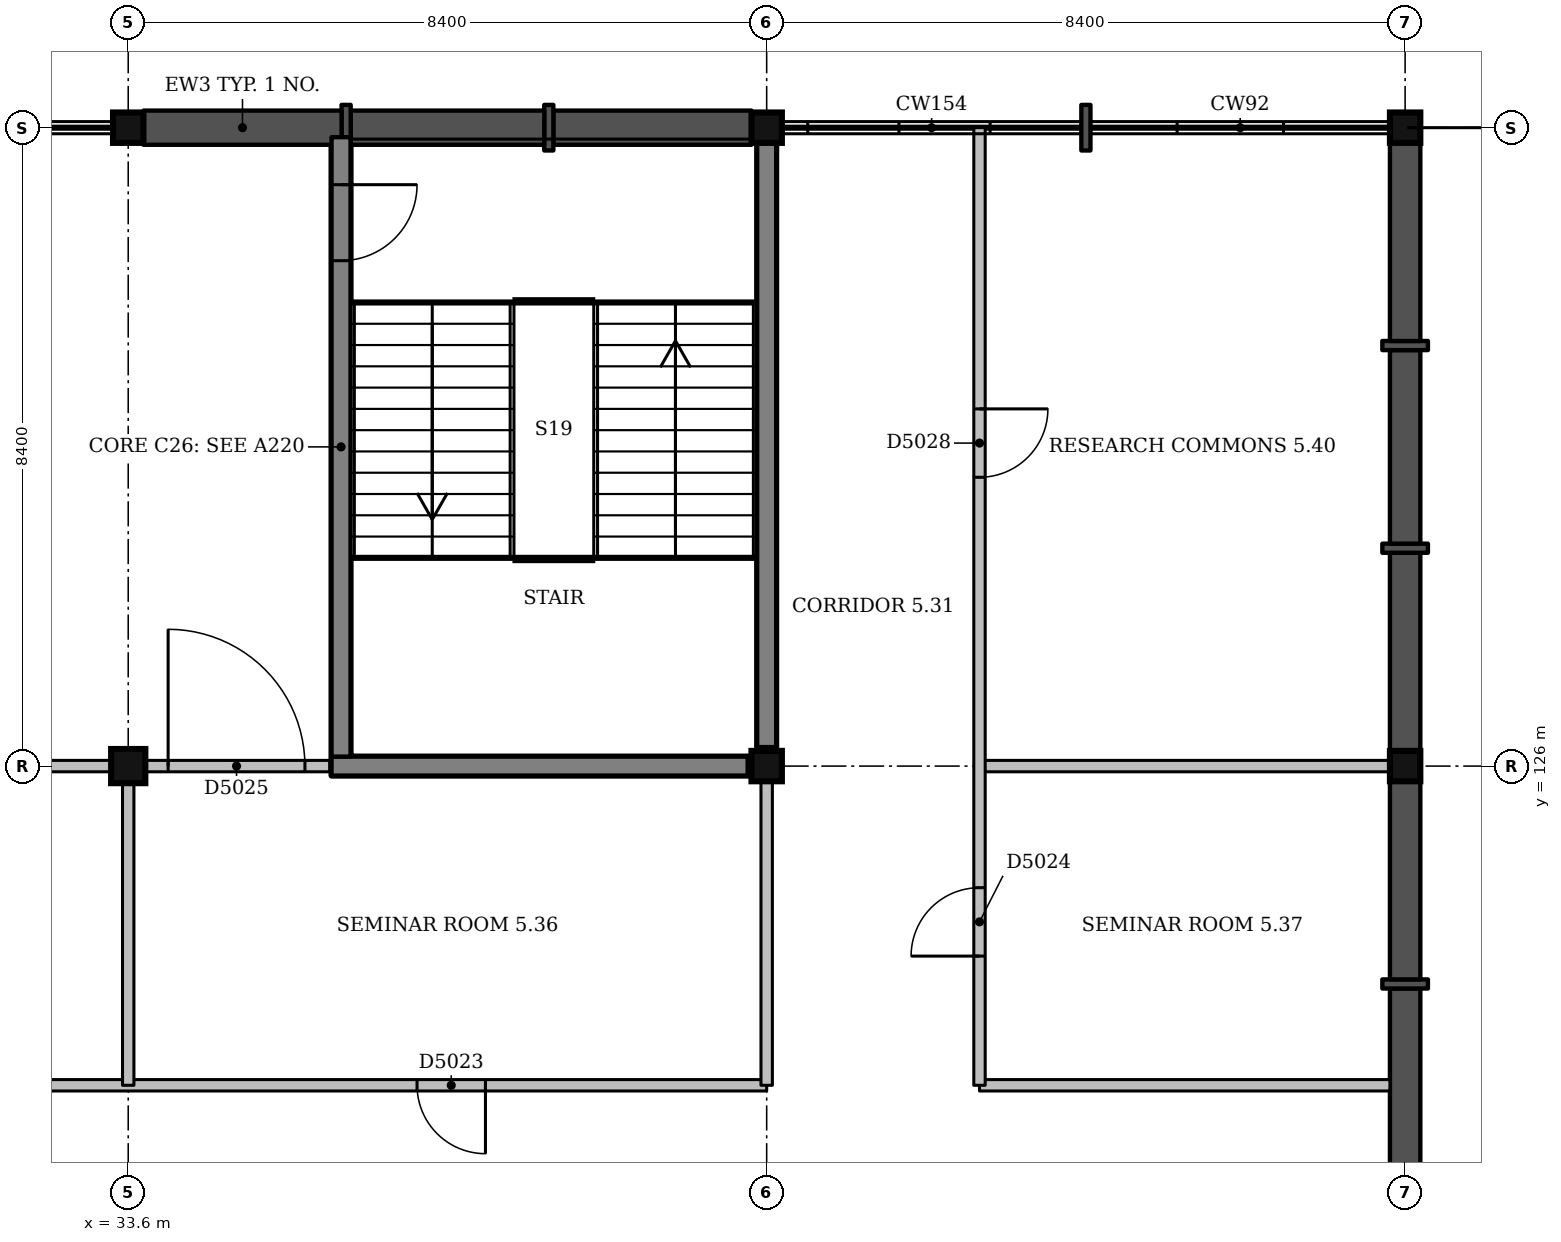
"""IFC4 building model, lengths in metres.
Left out: names, types, materials, properties, quantities, classifications, styles, units other than length and angle.
Written with IfcOpenShell. Run it as: python <this file> out.ifc"""

import sys

from ifc_helpers import new_model, si_unit, direction, frame, frame_2d, origin, origin_2d, place, context, subcontext, project, spatial, rectangle, extrude, element, fill, save


model = new_model("IFC4")
c1 = context("Model", 3, precision=1e-05, world=origin(), true_north=direction((0.0, 1.0)))
c2 = subcontext(c1, "Body", "Model", "MODEL_VIEW")
j1 = project(units=[si_unit("LENGTHUNIT", "METRE"), si_unit("PLANEANGLEUNIT", "RADIAN")], contexts=[c1])
p1 = place(None, origin())
s1 = spatial("IfcSite", under=j1, at=p1, CompositionType="ELEMENT")
p2 = place(p1, origin())
s2 = spatial("IfcBuilding", under=s1, at=p2, CompositionType="ELEMENT")
p3 = place(p2, frame((0.0, 0.0, 22.5)))
s3 = spatial("IfcBuildingStorey", under=s2, at=p3, CompositionType="ELEMENT", Elevation=22.5)
p4 = place(p3, frame((33.6, 126.0, 0.0), z_axis=(0.0, 0.0, 1.0), x_axis=(1.0, 0.0, 0.0)))
e1 = element("IfcColumn", 1, at=p4, inside=s3, PredefinedType="COLUMN", context=c2, shape_type="SweptSolid", body=[
    extrude(rectangle(XDim=0.45, YDim=0.45, at=origin_2d()), origin(), (0.0, 0.0, 1.0), 4.5),
])
for number, where, z_axis, x_axis in (
    (2, (33.6, 134.4, 0.0), (0.0, 0.0, 1.0), (1.0, 0.0, 0.0)),
    (3, (42.0, 126.0, 0.0), (0.0, 0.0, 1.0), (1.0, 0.0, 0.0)),
    (4, (42.0, 134.4, 0.0), (0.0, 0.0, 1.0), (1.0, 0.0, 0.0)),
    (5, (50.4, 126.0, 0.0), (0.0, 0.0, 1.0), (1.0, 0.0, 0.0)),
    (6, (50.4, 134.4, 0.0), (0.0, 0.0, 1.0), (1.0, 0.0, 0.0)),
):
    element("IfcColumn", number, at=place(p3, frame(where, z_axis=z_axis, x_axis=x_axis)), inside=s3, PredefinedType="COLUMN", context=c2, shape_type="SweptSolid", body=[
        extrude(rectangle(XDim=0.4, YDim=0.4, at=origin_2d()), origin(), (0.0, 0.0, 1.0), 4.5),
    ])
p5 = place(p3, frame((36.275, 126.0, 0.0), z_axis=(0.0, 0.0, 1.0), x_axis=(1.0, 0.0, 0.0)))
e7 = element("IfcWall", 7, at=p5, inside=s3, PredefinedType="SHEAR", context=c2, shape_type="SweptSolid", body=[
    extrude(rectangle(XDim=5.475, YDim=0.25, at=frame_2d((2.738, 0.0))), origin(), (0.0, 0.0, 1.0), 4.5),
])
p6 = place(p3, frame((36.4, 126.125, 0.0), z_axis=(0.0, 0.0, 1.0), x_axis=(0.0, 1.0, 0.0)))
e8 = element("IfcWall", 8, at=p6, inside=s3, PredefinedType="SHEAR", context=c2, shape_type="SweptSolid", body=[
    extrude(rectangle(XDim=8.15, YDim=0.25, at=frame_2d((4.075, 0.0))), origin(), (0.0, 0.0, 1.0), 4.5),
])
p7 = place(p6, frame((6.525, 0.0, 0.0)))
e9 = element("IfcOpeningElement", 9, at=p7, cuts=e8, PredefinedType="OPENING", context=c2, shape_type="SweptSolid", body=[
    extrude(rectangle(XDim=1.0, YDim=2.1, at=frame_2d((0.5, 1.05))), frame((0.0, 0.135, 0.0), z_axis=(0.0, -1.0, 0.0), x_axis=(1.0, 0.0, 0.0)), (0.0, 0.0, 1.0), 0.27),
])
p8 = place(p3, frame((42.0, 126.25, 0.0), z_axis=(0.0, 0.0, 1.0), x_axis=(0.0, 1.0, 0.0)))
e10 = element("IfcWall", 10, at=p8, inside=s3, PredefinedType="SHEAR", context=c2, shape_type="SweptSolid", body=[
    extrude(rectangle(XDim=7.95, YDim=0.25, at=frame_2d((3.975, 0.0))), origin(), (0.0, 0.0, 1.0), 4.5),
])
p9 = place(p3, frame((50.4, 120.527, 0.0), z_axis=(0.0, 0.0, 1.0), x_axis=(0.0, 1.0, 0.0)))
e11 = element("IfcWall", 11, at=p9, inside=s3, PredefinedType="SOLIDWALL", context=c2, shape_type="SweptSolid", body=[
    extrude(rectangle(XDim=2.547, YDim=0.4, at=frame_2d((1.273, 0.0))), origin(), (0.0, 0.0, 1.0), 3.35),
])
p10 = place(p3, frame((50.4, 123.073, 0.0), z_axis=(0.0, 0.0, 1.0), x_axis=(0.0, 1.0, 0.0)))
e12 = element("IfcWall", 12, at=p10, inside=s3, PredefinedType="SOLIDWALL", context=c2, shape_type="SweptSolid", body=[
    extrude(rectangle(XDim=0.12, YDim=0.6, at=frame_2d((0.06, 0.0))), origin(), (0.0, 0.0, 1.0), 3.35),
])
for number, where, z_axis, x_axis in (
    (13, (50.4, 123.193, 0.0), (0.0, 0.0, 1.0), (0.0, 1.0, 0.0)),
    (14, (50.4, 126.2, 0.0), (0.0, 0.0, 1.0), (0.0, 1.0, 0.0)),
):
    element("IfcWall", number, at=place(p3, frame(where, z_axis=z_axis, x_axis=x_axis)), inside=s3, PredefinedType="SOLIDWALL", context=c2, shape_type="SweptSolid", body=[
        extrude(rectangle(XDim=2.607, YDim=0.4, at=frame_2d((1.303, 0.0))), origin(), (0.0, 0.0, 1.0), 3.35),
    ])
p11 = place(p3, frame((50.4, 128.807, 0.0), z_axis=(0.0, 0.0, 1.0), x_axis=(0.0, 1.0, 0.0)))
e15 = element("IfcWall", 15, at=p11, inside=s3, PredefinedType="SOLIDWALL", context=c2, shape_type="SweptSolid", body=[
    extrude(rectangle(XDim=0.12, YDim=0.6, at=frame_2d((0.06, 0.0))), origin(), (0.0, 0.0, 1.0), 3.35),
])
p12 = place(p3, frame((50.4, 128.927, 0.0), z_axis=(0.0, 0.0, 1.0), x_axis=(0.0, 1.0, 0.0)))
e16 = element("IfcWall", 16, at=p12, inside=s3, PredefinedType="SOLIDWALL", context=c2, shape_type="SweptSolid", body=[
    extrude(rectangle(XDim=2.547, YDim=0.4, at=frame_2d((1.273, 0.0))), origin(), (0.0, 0.0, 1.0), 3.35),
])
p13 = place(p3, frame((50.4, 131.473, 0.0), z_axis=(0.0, 0.0, 1.0), x_axis=(0.0, 1.0, 0.0)))
e17 = element("IfcWall", 17, at=p13, inside=s3, PredefinedType="SOLIDWALL", context=c2, shape_type="SweptSolid", body=[
    extrude(rectangle(XDim=0.12, YDim=0.6, at=frame_2d((0.06, 0.0))), origin(), (0.0, 0.0, 1.0), 3.35),
])
p14 = place(p3, frame((50.4, 131.593, 0.0), z_axis=(0.0, 0.0, 1.0), x_axis=(0.0, 1.0, 0.0)))
e18 = element("IfcWall", 18, at=p14, inside=s3, PredefinedType="SOLIDWALL", context=c2, shape_type="SweptSolid", body=[
    extrude(rectangle(XDim=2.607, YDim=0.4, at=frame_2d((1.303, 0.0))), origin(), (0.0, 0.0, 1.0), 3.35),
])
p15 = place(p3, frame((46.26, 134.4, 0.0), z_axis=(0.0, 0.0, 1.0), x_axis=(-1.0, 0.0, 0.0)))
e19 = element("IfcWall", 19, at=p15, inside=s3, PredefinedType="SOLIDWALL", context=c2, shape_type="SweptSolid", body=[
    extrude(rectangle(XDim=0.12, YDim=0.6, at=frame_2d((0.06, 0.0))), origin(), (0.0, 0.0, 1.0), 3.35),
])
p16 = place(p3, frame((41.8, 134.4, 0.0), z_axis=(0.0, 0.0, 1.0), x_axis=(-1.0, 0.0, 0.0)))
e20 = element("IfcWall", 20, at=p16, inside=s3, PredefinedType="SOLIDWALL", context=c2, shape_type="SweptSolid", body=[
    extrude(rectangle(XDim=2.607, YDim=0.45, at=frame_2d((1.303, 0.0))), origin(), (0.0, 0.0, 1.0), 3.35),
])
p17 = place(p3, frame((39.193, 134.4, 0.0), z_axis=(0.0, 0.0, 1.0), x_axis=(-1.0, 0.0, 0.0)))
e21 = element("IfcWall", 21, at=p17, inside=s3, PredefinedType="SOLIDWALL", context=c2, shape_type="SweptSolid", body=[
    extrude(rectangle(XDim=0.12, YDim=0.6, at=frame_2d((0.06, 0.0))), origin(), (0.0, 0.0, 1.0), 3.35),
])
p18 = place(p3, frame((39.073, 134.4, 0.0), z_axis=(0.0, 0.0, 1.0), x_axis=(-1.0, 0.0, 0.0)))
e22 = element("IfcWall", 22, at=p18, inside=s3, PredefinedType="SOLIDWALL", context=c2, shape_type="SweptSolid", body=[
    extrude(rectangle(XDim=2.547, YDim=0.45, at=frame_2d((1.273, 0.0))), origin(), (0.0, 0.0, 1.0), 3.35),
])
p19 = place(p3, frame((36.527, 134.4, 0.0), z_axis=(0.0, 0.0, 1.0), x_axis=(-1.0, 0.0, 0.0)))
e23 = element("IfcWall", 23, at=p19, inside=s3, PredefinedType="SOLIDWALL", context=c2, shape_type="SweptSolid", body=[
    extrude(rectangle(XDim=0.12, YDim=0.6, at=frame_2d((0.06, 0.0))), origin(), (0.0, 0.0, 1.0), 3.35),
])
p20 = place(p3, frame((36.407, 134.4, 0.0), z_axis=(0.0, 0.0, 1.0), x_axis=(-1.0, 0.0, 0.0)))
e24 = element("IfcWall", 24, at=p20, inside=s3, PredefinedType="SOLIDWALL", context=c2, shape_type="SweptSolid", body=[
    extrude(rectangle(XDim=2.607, YDim=0.45, at=frame_2d((1.303, 0.0))), origin(), (0.0, 0.0, 1.0), 3.35),
])
p21 = place(p3, frame((16.8, 121.8, 0.0), z_axis=(0.0, 0.0, 1.0), x_axis=(1.0, 0.0, 0.0)))
e25 = element("IfcWall", 25, at=p21, inside=s3, PredefinedType="PARTITIONING", context=c2, shape_type="SweptSolid", body=[
    extrude(rectangle(XDim=25.2, YDim=0.15, at=frame_2d((12.6, 0.0))), origin(), (0.0, 0.0, 1.0), 3.4),
])
p22 = place(p21, frame((3.8, 0.0, 0.0)))
e26 = element("IfcOpeningElement", 26, at=p22, cuts=e25, PredefinedType="OPENING", context=c2, shape_type="SweptSolid", body=[
    extrude(rectangle(XDim=0.9, YDim=2.1, at=frame_2d((0.45, 1.05))), frame((0.0, 0.085, 0.0), z_axis=(0.0, -1.0, 0.0), x_axis=(1.0, 0.0, 0.0)), (0.0, 0.0, 1.0), 0.17),
])
p23 = place(p21, frame((12.2, 0.0, 0.0)))
e27 = element("IfcOpeningElement", 27, at=p23, cuts=e25, PredefinedType="OPENING", context=c2, shape_type="SweptSolid", body=[
    extrude(rectangle(XDim=0.9, YDim=2.1, at=frame_2d((0.45, 1.05))), frame((0.0, 0.085, 0.0), z_axis=(0.0, -1.0, 0.0), x_axis=(1.0, 0.0, 0.0)), (0.0, 0.0, 1.0), 0.17),
])
p24 = place(p21, frame((20.6, 0.0, 0.0)))
e28 = element("IfcOpeningElement", 28, at=p24, cuts=e25, PredefinedType="OPENING", context=c2, shape_type="SweptSolid", body=[
    extrude(rectangle(XDim=0.9, YDim=2.1, at=frame_2d((0.45, 1.05))), frame((0.0, 0.085, 0.0), z_axis=(0.0, -1.0, 0.0), x_axis=(1.0, 0.0, 0.0)), (0.0, 0.0, 1.0), 0.17),
])
p25 = place(p3, frame((44.8, 121.8, 0.0), z_axis=(0.0, 0.0, 1.0), x_axis=(1.0, 0.0, 0.0)))
e29 = element("IfcWall", 29, at=p25, inside=s3, PredefinedType="PARTITIONING", context=c2, shape_type="SweptSolid", body=[
    extrude(rectangle(XDim=5.4, YDim=0.15, at=frame_2d((2.7, 0.0))), origin(), (0.0, 0.0, 1.0), 3.35),
])
p26 = place(p3, frame((25.425, 126.0, 0.0), z_axis=(0.0, 0.0, 1.0), x_axis=(1.0, 0.0, 0.0)))
e30 = element("IfcWall", 30, at=p26, inside=s3, PredefinedType="PARTITIONING", context=c2, shape_type="SweptSolid", body=[
    extrude(rectangle(XDim=7.95, YDim=0.15, at=frame_2d((3.975, 0.0))), origin(), (0.0, 0.0, 1.0), 3.4),
])
p27 = place(p3, frame((33.825, 126.0, 0.0), z_axis=(0.0, 0.0, 1.0), x_axis=(1.0, 0.0, 0.0)))
e31 = element("IfcWall", 31, at=p27, inside=s3, PredefinedType="PARTITIONING", context=c2, shape_type="SweptSolid", body=[
    extrude(rectangle(XDim=2.425, YDim=0.15, at=frame_2d((1.212, 0.0))), origin(), (0.0, 0.0, 1.0), 3.4),
])
p28 = place(p27, frame((0.3, 0.0, 0.0)))
e32 = element("IfcOpeningElement", 32, at=p28, cuts=e31, PredefinedType="OPENING", context=c2, shape_type="SweptSolid", body=[
    extrude(rectangle(XDim=1.8, YDim=2.1, at=frame_2d((0.9, 1.05))), frame((0.0, 0.085, 0.0), z_axis=(0.0, -1.0, 0.0), x_axis=(1.0, 0.0, 0.0)), (0.0, 0.0, 1.0), 0.17),
])
p29 = place(p3, frame((44.8, 126.0, 0.0), z_axis=(0.0, 0.0, 1.0), x_axis=(1.0, 0.0, 0.0)))
e33 = element("IfcWall", 33, at=p29, inside=s3, PredefinedType="PARTITIONING", context=c2, shape_type="SweptSolid", body=[
    extrude(rectangle(XDim=5.4, YDim=0.15, at=frame_2d((2.7, 0.0))), origin(), (0.0, 0.0, 1.0), 3.35),
])
p30 = place(p3, frame((33.6, 121.8, 0.0), z_axis=(0.0, 0.0, 1.0), x_axis=(0.0, 1.0, 0.0)))
e34 = element("IfcWall", 34, at=p30, inside=s3, PredefinedType="PARTITIONING", context=c2, shape_type="SweptSolid", body=[
    extrude(rectangle(XDim=3.975, YDim=0.15, at=frame_2d((1.987, 0.0))), origin(), (0.0, 0.0, 1.0), 3.4),
])
p31 = place(p3, frame((42.0, 121.8, 0.0), z_axis=(0.0, 0.0, 1.0), x_axis=(0.0, 1.0, 0.0)))
e35 = element("IfcWall", 35, at=p31, inside=s3, PredefinedType="PARTITIONING", context=c2, shape_type="SweptSolid", body=[
    extrude(rectangle(XDim=4.0, YDim=0.15, at=frame_2d((2.0, 0.0))), origin(), (0.0, 0.0, 1.0), 3.4),
])
p32 = place(p3, frame((44.8, 121.8, 0.0), z_axis=(0.0, 0.0, 1.0), x_axis=(0.0, 1.0, 0.0)))
e36 = element("IfcWall", 36, at=p32, inside=s3, PredefinedType="PARTITIONING", context=c2, shape_type="SweptSolid", body=[
    extrude(rectangle(XDim=12.6, YDim=0.15, at=frame_2d((6.3, 0.0))), origin(), (0.0, 0.0, 1.0), 3.27),
])
p33 = place(p32, frame((1.7, 0.0, 0.0)))
e37 = element("IfcOpeningElement", 37, at=p33, cuts=e36, PredefinedType="OPENING", context=c2, shape_type="SweptSolid", body=[
    extrude(rectangle(XDim=0.9, YDim=2.1, at=frame_2d((0.45, 1.05))), frame((0.0, 0.085, 0.0), z_axis=(0.0, -1.0, 0.0), x_axis=(1.0, 0.0, 0.0)), (0.0, 0.0, 1.0), 0.17),
])
p34 = place(p32, frame((8.0, 0.0, 0.0)))
e38 = element("IfcOpeningElement", 38, at=p34, cuts=e36, PredefinedType="OPENING", context=c2, shape_type="SweptSolid", body=[
    extrude(rectangle(XDim=0.9, YDim=2.1, at=frame_2d((0.45, 1.05))), frame((0.0, 0.085, 0.0), z_axis=(0.0, -1.0, 0.0), x_axis=(1.0, 0.0, 0.0)), (0.0, 0.0, 1.0), 0.17),
])
p35 = place(p24, origin())
e39 = element("IfcDoor", 39, at=p35, inside=s3, OperationType="SINGLE_SWING_RIGHT", PredefinedType="DOOR", context=c2, shape_type="SweptSolid", body=[
    extrude(rectangle(XDim=0.9, YDim=2.1, at=frame_2d((0.45, 1.05))), frame((0.0, 0.025, 0.0), z_axis=(0.0, -1.0, 0.0), x_axis=(1.0, 0.0, 0.0)), (0.0, 0.0, 1.0), 0.05),
])
fill(e28, e39)
p36 = place(p33, origin())
e40 = element("IfcDoor", 40, at=p36, inside=s3, OperationType="SINGLE_SWING_LEFT", PredefinedType="DOOR", context=c2, shape_type="SweptSolid", body=[
    extrude(rectangle(XDim=0.9, YDim=2.1, at=frame_2d((0.45, 1.05))), frame((0.0, 0.025, 0.0), z_axis=(0.0, -1.0, 0.0), x_axis=(1.0, 0.0, 0.0)), (0.0, 0.0, 1.0), 0.05),
])
fill(e37, e40)
p37 = place(p28, origin())
e41 = element("IfcDoor", 41, at=p37, inside=s3, OperationType="DOUBLE_DOOR_SINGLE_SWING", PredefinedType="DOOR", context=c2, shape_type="SweptSolid", body=[
    extrude(rectangle(XDim=1.8, YDim=2.1, at=frame_2d((0.9, 1.05))), frame((0.0, 0.025, 0.0), z_axis=(0.0, -1.0, 0.0), x_axis=(1.0, 0.0, 0.0)), (0.0, 0.0, 1.0), 0.05),
])
fill(e32, e41)
p38 = place(p34, origin())
e42 = element("IfcDoor", 42, at=p38, inside=s3, OperationType="SINGLE_SWING_RIGHT", PredefinedType="DOOR", context=c2, shape_type="SweptSolid", body=[
    extrude(rectangle(XDim=0.9, YDim=2.1, at=frame_2d((0.45, 1.05))), frame((0.0, 0.025, 0.0), z_axis=(0.0, -1.0, 0.0), x_axis=(1.0, 0.0, 0.0)), (0.0, 0.0, 1.0), 0.05),
])
fill(e38, e42)
p39 = place(p7, origin())
e43 = element("IfcDoor", 43, at=p39, inside=s3, OperationType="SINGLE_SWING_RIGHT", PredefinedType="DOOR", context=c2, shape_type="SweptSolid", body=[
    extrude(rectangle(XDim=1.0, YDim=2.1, at=frame_2d((0.5, 1.05))), frame((0.0, 0.025, 0.0), z_axis=(0.0, -1.0, 0.0), x_axis=(1.0, 0.0, 0.0)), (0.0, 0.0, 1.0), 0.05),
])
fill(e9, e43)
save(model, sys.argv[1])
